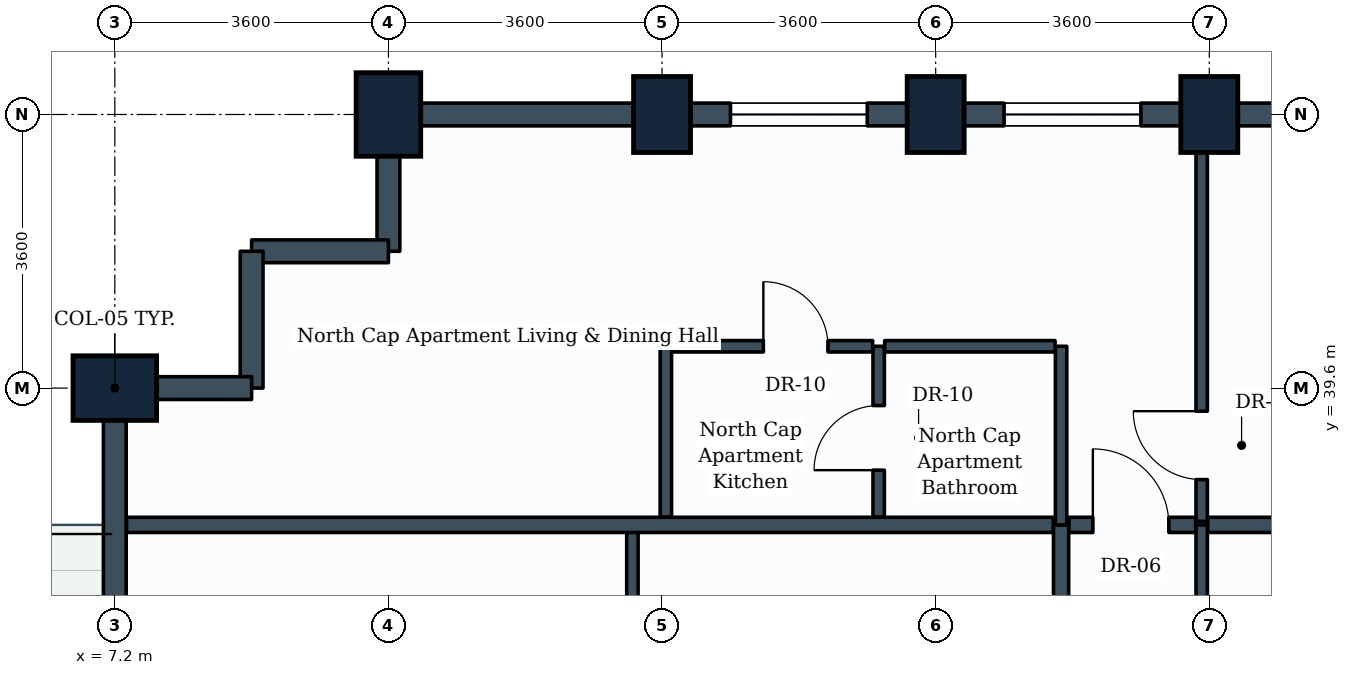
"""IFC4 building model, lengths in metres.
Left out: names, types, materials, properties, quantities, classifications, styles, units other than length and angle.
Written with IfcOpenShell. Run it as: python <this file> out.ifc"""

import sys

from ifc_helpers import new_model, si_unit, direction, frame, frame_2d, origin, origin_2d, place, context, subcontext, project, spatial, rectangle, extrude, element, fill, save


model = new_model("IFC4")
c1 = context("Model", 3, precision=1e-05, world=origin(), true_north=direction((0.0, 1.0)))
c2 = subcontext(c1, "Body", "Model", "MODEL_VIEW")
j1 = project(units=[si_unit("LENGTHUNIT", "METRE"), si_unit("PLANEANGLEUNIT", "RADIAN")], contexts=[c1])
p1 = place(None, origin())
s1 = spatial("IfcSite", under=j1, at=p1, CompositionType="ELEMENT")
p2 = place(p1, origin())
s2 = spatial("IfcBuilding", under=s1, at=p2, CompositionType="ELEMENT")
p3 = place(p2, frame((0.0, 0.0, 150.4)))
s3 = spatial("IfcBuildingStorey", under=s2, at=p3, CompositionType="ELEMENT", Elevation=150.4)
for number, where, z_axis, x_axis in (
    (1, (7.2, 39.6, 0.0), (0.0, 0.0, 1.0), (0.0, 1.0, 0.0)),
    (2, (10.8, 43.2, 0.0), (0.0, 0.0, 1.0), (1.0, 0.0, 0.0)),
):
    element("IfcColumn", number, at=place(p3, frame(where, z_axis=z_axis, x_axis=x_axis)), inside=s3, PredefinedType="COLUMN", context=c2, shape_type="SweptSolid", body=[
        extrude(rectangle(XDim=0.85, YDim=1.1, at=origin_2d()), origin(), (0.0, 0.0, 1.0), 3.8),
    ])
for number, where, z_axis, x_axis in (
    (3, (14.4, 43.2, 0.0), (0.0, 0.0, 1.0), (1.0, 0.0, 0.0)),
    (4, (18.0, 43.2, 0.0), (0.0, 0.0, 1.0), (1.0, 0.0, 0.0)),
    (5, (21.6, 43.2, 0.0), (0.0, 0.0, 1.0), (1.0, 0.0, 0.0)),
):
    element("IfcColumn", number, at=place(p3, frame(where, z_axis=z_axis, x_axis=x_axis)), inside=s3, PredefinedType="COLUMN", context=c2, shape_type="SweptSolid", body=[
        extrude(rectangle(XDim=0.75, YDim=1.0, at=origin_2d()), origin(), (0.0, 0.0, 1.0), 3.8),
    ])
p4 = place(p3, frame((21.6, 43.2, 0.0), z_axis=(0.0, 0.0, 1.0), x_axis=(1.0, 0.0, 0.0)))
e6 = element("IfcWall", 6, at=p4, inside=s3, PredefinedType="STANDARD", context=c2, shape_type="SweptSolid", body=[
    extrude(rectangle(XDim=3.6, YDim=0.3, at=frame_2d((1.8, 0.0))), origin(), (0.0, 0.0, 1.0), 2.93),
])
p5 = place(p4, frame((0.875, 0.0, 0.85)))
e7 = element("IfcOpeningElement", 7, at=p5, cuts=e6, PredefinedType="OPENING", context=c2, shape_type="SweptSolid", body=[
    extrude(rectangle(XDim=1.8, YDim=1.35, at=frame_2d((0.9, 0.675))), frame((0.0, 0.16, 0.0), z_axis=(0.0, -1.0, 0.0), x_axis=(1.0, 0.0, 0.0)), (0.0, 0.0, 1.0), 0.32),
])
p6 = place(p3, frame((18.0, 43.2, 0.0), z_axis=(0.0, 0.0, 1.0), x_axis=(1.0, 0.0, 0.0)))
e8 = element("IfcWall", 8, at=p6, inside=s3, PredefinedType="STANDARD", context=c2, shape_type="SweptSolid", body=[
    extrude(rectangle(XDim=3.6, YDim=0.3, at=frame_2d((1.8, 0.0))), origin(), (0.0, 0.0, 1.0), 2.93),
])
p7 = place(p6, frame((0.9, 0.0, 0.85)))
e9 = element("IfcOpeningElement", 9, at=p7, cuts=e8, PredefinedType="OPENING", context=c2, shape_type="SweptSolid", body=[
    extrude(rectangle(XDim=1.8, YDim=1.35, at=frame_2d((0.9, 0.675))), frame((0.0, 0.16, 0.0), z_axis=(0.0, -1.0, 0.0), x_axis=(1.0, 0.0, 0.0)), (0.0, 0.0, 1.0), 0.32),
])
p8 = place(p3, frame((14.4, 43.2, 0.0), z_axis=(0.0, 0.0, 1.0), x_axis=(1.0, 0.0, 0.0)))
e10 = element("IfcWall", 10, at=p8, inside=s3, PredefinedType="STANDARD", context=c2, shape_type="SweptSolid", body=[
    extrude(rectangle(XDim=3.6, YDim=0.3, at=frame_2d((1.8, 0.0))), origin(), (0.0, 0.0, 1.0), 2.93),
])
p9 = place(p8, frame((0.9, 0.0, 0.85)))
e11 = element("IfcOpeningElement", 11, at=p9, cuts=e10, PredefinedType="OPENING", context=c2, shape_type="SweptSolid", body=[
    extrude(rectangle(XDim=1.8, YDim=1.35, at=frame_2d((0.9, 0.675))), frame((0.0, 0.16, 0.0), z_axis=(0.0, -1.0, 0.0), x_axis=(1.0, 0.0, 0.0)), (0.0, 0.0, 1.0), 0.32),
])
p10 = place(p3, frame((10.8, 43.2, 0.0), z_axis=(0.0, 0.0, 1.0), x_axis=(1.0, 0.0, 0.0)))
e12 = element("IfcWall", 12, at=p10, inside=s3, PredefinedType="STANDARD", context=c2, shape_type="SweptSolid", body=[
    extrude(rectangle(XDim=3.6, YDim=0.3, at=frame_2d((1.8, 0.0))), origin(), (0.0, 0.0, 1.0), 2.93),
])
p11 = place(p3, frame((10.8, 41.4, 0.0), z_axis=(0.0, 0.0, 1.0), x_axis=(0.0, 1.0, 0.0)))
e13 = element("IfcWall", 13, at=p11, inside=s3, PredefinedType="STANDARD", context=c2, shape_type="SweptSolid", body=[
    extrude(rectangle(XDim=1.8, YDim=0.3, at=frame_2d((0.9, 0.0))), origin(), (0.0, 0.0, 1.0), 2.93),
])
p12 = place(p3, frame((9.0, 41.4, 0.0), z_axis=(0.0, 0.0, 1.0), x_axis=(1.0, 0.0, 0.0)))
e14 = element("IfcWall", 14, at=p12, inside=s3, PredefinedType="STANDARD", context=c2, shape_type="SweptSolid", body=[
    extrude(rectangle(XDim=1.8, YDim=0.3, at=frame_2d((0.9, 0.0))), origin(), (0.0, 0.0, 1.0), 3.535),
])
p13 = place(p3, frame((9.0, 39.6, 0.0), z_axis=(0.0, 0.0, 1.0), x_axis=(0.0, 1.0, 0.0)))
e15 = element("IfcWall", 15, at=p13, inside=s3, PredefinedType="STANDARD", context=c2, shape_type="SweptSolid", body=[
    extrude(rectangle(XDim=1.8, YDim=0.3, at=frame_2d((0.9, 0.0))), origin(), (0.0, 0.0, 1.0), 3.535),
])
p14 = place(p3, frame((7.2, 39.6, 0.0), z_axis=(0.0, 0.0, 1.0), x_axis=(1.0, 0.0, 0.0)))
e16 = element("IfcWall", 16, at=p14, inside=s3, PredefinedType="STANDARD", context=c2, shape_type="SweptSolid", body=[
    extrude(rectangle(XDim=1.8, YDim=0.3, at=frame_2d((0.9, 0.0))), origin(), (0.0, 0.0, 1.0), 2.93),
])
p15 = place(p3, frame((7.2, 36.0, 0.0), z_axis=(0.0, 0.0, 1.0), x_axis=(0.0, 1.0, 0.0)))
e17 = element("IfcWall", 17, at=p15, inside=s3, PredefinedType="STANDARD", context=c2, shape_type="SweptSolid", body=[
    extrude(rectangle(XDim=3.6, YDim=0.3, at=frame_2d((1.8, 0.0))), origin(), (0.0, 0.0, 1.0), 2.93),
])
p16 = place(p3, frame((19.65, 33.7, 0.0), z_axis=(0.0, 0.0, 1.0), x_axis=(0.0, 1.0, 0.0)))
e18 = element("IfcWall", 18, at=p16, inside=s3, PredefinedType="PARTITIONING", context=c2, shape_type="SweptSolid", body=[
    extrude(rectangle(XDim=4.1, YDim=0.2, at=frame_2d((2.05, 0.0))), origin(), (0.0, 0.0, 1.0), 3.17),
])
p17 = place(p16, frame((1.55, 0.0, 0.0)))
e19 = element("IfcOpeningElement", 19, at=p17, cuts=e18, PredefinedType="OPENING", context=c2, shape_type="SweptSolid", body=[
    extrude(rectangle(XDim=1.0, YDim=2.1, at=frame_2d((0.5, 1.05))), frame((0.0, 0.11, 0.0), z_axis=(0.0, -1.0, 0.0), x_axis=(1.0, 0.0, 0.0)), (0.0, 0.0, 1.0), 0.22),
])
p18 = place(p3, frame((14.01, 33.9, 0.0), z_axis=(0.0, 0.0, 1.0), x_axis=(0.0, 1.0, 0.0)))
e20 = element("IfcWall", 20, at=p18, inside=s3, PredefinedType="PARTITIONING", context=c2, shape_type="SweptSolid", body=[
    extrude(rectangle(XDim=3.9, YDim=0.15, at=frame_2d((1.95, 0.0))), origin(), (0.0, 0.0, 1.0), 3.17),
])
p19 = place(p18, frame((1.461, 0.0, 0.0)))
e21 = element("IfcOpeningElement", 21, at=p19, cuts=e20, PredefinedType="OPENING", context=c2, shape_type="SweptSolid", body=[
    extrude(rectangle(XDim=0.9, YDim=2.1, at=frame_2d((0.45, 1.05))), frame((0.0, 0.085, 0.0), z_axis=(0.0, -1.0, 0.0), x_axis=(1.0, 0.0, 0.0)), (0.0, 0.0, 1.0), 0.17),
])
p20 = place(p3, frame((21.5, 32.379, 0.0), z_axis=(0.0, 0.0, 1.0), x_axis=(0.0, 1.0, 0.0)))
e22 = element("IfcWall", 22, at=p20, inside=s3, PredefinedType="PARTITIONING", context=c2, shape_type="SweptSolid", body=[
    extrude(rectangle(XDim=5.421, YDim=0.15, at=frame_2d((2.71, 0.0))), origin(), (0.0, 0.0, 1.0), 3.17),
])
p21 = place(p20, frame((2.171, 0.0, 0.0)))
e23 = element("IfcOpeningElement", 23, at=p21, cuts=e22, PredefinedType="OPENING", context=c2, shape_type="SweptSolid", body=[
    extrude(rectangle(XDim=1.0, YDim=2.1, at=frame_2d((0.5, 1.05))), frame((0.0, 0.085, 0.0), z_axis=(0.0, -1.0, 0.0), x_axis=(1.0, 0.0, 0.0)), (0.0, 0.0, 1.0), 0.17),
])
p22 = place(p3, frame((7.354, 37.8, 0.0), z_axis=(0.0, 0.0, 1.0), x_axis=(1.0, 0.0, 0.0)))
e24 = element("IfcWall", 24, at=p22, inside=s3, PredefinedType="PARTITIONING", context=c2, shape_type="SweptSolid", body=[
    extrude(rectangle(XDim=12.192, YDim=0.2, at=frame_2d((6.096, 0.0))), origin(), (0.0, 0.0, 1.0), 2.93),
])
p23 = place(p3, frame((21.579, 37.8, 0.0), z_axis=(0.0, 0.0, 1.0), x_axis=(1.0, 0.0, 0.0)))
e25 = element("IfcWall", 25, at=p23, inside=s3, PredefinedType="PARTITIONING", context=c2, shape_type="SweptSolid", body=[
    extrude(rectangle(XDim=5.121, YDim=0.2, at=frame_2d((2.561, 0.0))), origin(), (0.0, 0.0, 1.0), 3.535),
])
p24 = place(p3, frame((19.754, 37.8, 0.0), z_axis=(0.0, 0.0, 1.0), x_axis=(1.0, 0.0, 0.0)))
e26 = element("IfcWall", 26, at=p24, inside=s3, PredefinedType="PARTITIONING", context=c2, shape_type="SweptSolid", body=[
    extrude(rectangle(XDim=1.667, YDim=0.2, at=frame_2d((0.833, 0.0))), origin(), (0.0, 0.0, 1.0), 3.535),
])
p25 = place(p24, frame((0.314, 0.0, 0.0)))
e27 = element("IfcOpeningElement", 27, at=p25, cuts=e26, PredefinedType="OPENING", context=c2, shape_type="SweptSolid", body=[
    extrude(rectangle(XDim=1.0, YDim=2.1, at=frame_2d((0.5, 1.05))), frame((0.0, 0.11, 0.0), z_axis=(0.0, -1.0, 0.0), x_axis=(1.0, 0.0, 0.0)), (0.0, 0.0, 1.0), 0.22),
])
p26 = place(p3, frame((19.65, 37.8, 0.0), z_axis=(0.0, 0.0, 1.0), x_axis=(0.0, 1.0, 0.0)))
e28 = element("IfcWall", 28, at=p26, inside=s3, PredefinedType="PARTITIONING", context=c2, shape_type="SweptSolid", body=[
    extrude(rectangle(XDim=2.35, YDim=0.15, at=frame_2d((1.175, 0.0))), origin(), (0.0, 0.0, 1.0), 3.535),
])
p27 = place(p3, frame((17.25, 37.904, 0.0), z_axis=(0.0, 0.0, 1.0), x_axis=(0.0, 1.0, 0.0)))
e29 = element("IfcWall", 29, at=p27, inside=s3, PredefinedType="PARTITIONING", context=c2, shape_type="SweptSolid", body=[
    extrude(rectangle(XDim=2.246, YDim=0.15, at=frame_2d((1.123, 0.0))), origin(), (0.0, 0.0, 1.0), 3.535),
])
p28 = place(p27, frame((0.616, 0.0, 0.0)))
e30 = element("IfcOpeningElement", 30, at=p28, cuts=e29, PredefinedType="OPENING", context=c2, shape_type="SweptSolid", body=[
    extrude(rectangle(XDim=0.85, YDim=2.1, at=frame_2d((0.425, 1.05))), frame((0.0, 0.085, 0.0), z_axis=(0.0, -1.0, 0.0), x_axis=(1.0, 0.0, 0.0)), (0.0, 0.0, 1.0), 0.17),
])
p29 = place(p3, frame((17.329, 40.15, 0.0), z_axis=(0.0, 0.0, 1.0), x_axis=(1.0, 0.0, 0.0)))
e31 = element("IfcWall", 31, at=p29, inside=s3, PredefinedType="PARTITIONING", context=c2, shape_type="SweptSolid", body=[
    extrude(rectangle(XDim=2.242, YDim=0.15, at=frame_2d((1.121, 0.0))), origin(), (0.0, 0.0, 1.0), 3.17),
])
p30 = place(p3, frame((21.5, 37.846, 0.0), z_axis=(0.0, 0.0, 1.0), x_axis=(0.0, 1.0, 0.0)))
e32 = element("IfcWall", 32, at=p30, inside=s3, PredefinedType="PARTITIONING", context=c2, shape_type="SweptSolid", body=[
    extrude(rectangle(XDim=5.2, YDim=0.15, at=frame_2d((2.6, 0.0))), origin(), (0.0, 0.0, 1.0), 2.93),
])
p31 = place(p30, frame((0.55, 0.0, 0.0)))
e33 = element("IfcOpeningElement", 33, at=p31, cuts=e32, PredefinedType="OPENING", context=c2, shape_type="SweptSolid", body=[
    extrude(rectangle(XDim=0.9, YDim=2.1, at=frame_2d((0.45, 1.05))), frame((0.0, 0.085, 0.0), z_axis=(0.0, -1.0, 0.0), x_axis=(1.0, 0.0, 0.0)), (0.0, 0.0, 1.0), 0.17),
])
p32 = place(p3, frame((14.45, 37.904, 0.0), z_axis=(0.0, 0.0, 1.0), x_axis=(0.0, 1.0, 0.0)))
e34 = element("IfcWall", 34, at=p32, inside=s3, PredefinedType="PARTITIONING", context=c2, shape_type="SweptSolid", body=[
    extrude(rectangle(XDim=2.246, YDim=0.15, at=frame_2d((1.123, 0.0))), origin(), (0.0, 0.0, 1.0), 3.535),
])
p33 = place(p3, frame((14.529, 40.15, 0.0), z_axis=(0.0, 0.0, 1.0), x_axis=(1.0, 0.0, 0.0)))
e35 = element("IfcWall", 35, at=p33, inside=s3, PredefinedType="PARTITIONING", context=c2, shape_type="SweptSolid", body=[
    extrude(rectangle(XDim=2.642, YDim=0.15, at=frame_2d((1.321, 0.0))), origin(), (0.0, 0.0, 1.0), 3.535),
])
p34 = place(p33, frame((1.204, 0.0, 0.0)))
e36 = element("IfcOpeningElement", 36, at=p34, cuts=e35, PredefinedType="OPENING", context=c2, shape_type="SweptSolid", body=[
    extrude(rectangle(XDim=0.85, YDim=2.1, at=frame_2d((0.425, 1.05))), frame((0.0, 0.085, 0.0), z_axis=(0.0, -1.0, 0.0), x_axis=(1.0, 0.0, 0.0)), (0.0, 0.0, 1.0), 0.17),
])
p35 = place(p7, origin())
e37 = element("IfcWindow", 37, at=p35, inside=s3, PartitioningType="SINGLE_PANEL", PredefinedType="WINDOW", context=c2, shape_type="SweptSolid", body=[
    extrude(rectangle(XDim=1.8, YDim=1.35, at=frame_2d((0.9, 0.675))), frame((0.0, 0.03, 0.0), z_axis=(0.0, -1.0, 0.0), x_axis=(1.0, 0.0, 0.0)), (0.0, 0.0, 1.0), 0.06),
])
fill(e9, e37)
p36 = place(p9, origin())
e38 = element("IfcWindow", 38, at=p36, inside=s3, PartitioningType="SINGLE_PANEL", PredefinedType="WINDOW", context=c2, shape_type="SweptSolid", body=[
    extrude(rectangle(XDim=1.8, YDim=1.35, at=frame_2d((0.9, 0.675))), frame((0.0, 0.03, 0.0), z_axis=(0.0, -1.0, 0.0), x_axis=(1.0, 0.0, 0.0)), (0.0, 0.0, 1.0), 0.06),
])
fill(e11, e38)
p37 = place(p25, origin())
e39 = element("IfcDoor", 39, at=p37, inside=s3, OperationType="SINGLE_SWING_LEFT", PredefinedType="DOOR", context=c2, shape_type="SweptSolid", body=[
    extrude(rectangle(XDim=1.0, YDim=2.1, at=frame_2d((0.5, 1.05))), frame((0.0, 0.025, 0.0), z_axis=(0.0, -1.0, 0.0), x_axis=(1.0, 0.0, 0.0)), (0.0, 0.0, 1.0), 0.05),
])
fill(e27, e39)
p38 = place(p28, origin())
e40 = element("IfcDoor", 40, at=p38, inside=s3, OperationType="SINGLE_SWING_LEFT", PredefinedType="DOOR", context=c2, shape_type="SweptSolid", body=[
    extrude(rectangle(XDim=0.85, YDim=2.1, at=frame_2d((0.425, 1.05))), frame((0.0, 0.025, 0.0), z_axis=(0.0, -1.0, 0.0), x_axis=(1.0, 0.0, 0.0)), (0.0, 0.0, 1.0), 0.05),
])
fill(e30, e40)
p39 = place(p31, origin())
e41 = element("IfcDoor", 41, at=p39, inside=s3, OperationType="SINGLE_SWING_RIGHT", PredefinedType="DOOR", context=c2, shape_type="SweptSolid", body=[
    extrude(rectangle(XDim=0.9, YDim=2.1, at=frame_2d((0.45, 1.05))), frame((0.0, 0.025, 0.0), z_axis=(0.0, -1.0, 0.0), x_axis=(1.0, 0.0, 0.0)), (0.0, 0.0, 1.0), 0.05),
])
fill(e33, e41)
p40 = place(p34, origin())
e42 = element("IfcDoor", 42, at=p40, inside=s3, OperationType="SINGLE_SWING_LEFT", PredefinedType="DOOR", context=c2, shape_type="SweptSolid", body=[
    extrude(rectangle(XDim=0.85, YDim=2.1, at=frame_2d((0.425, 1.05))), frame((0.0, 0.025, 0.0), z_axis=(0.0, -1.0, 0.0), x_axis=(1.0, 0.0, 0.0)), (0.0, 0.0, 1.0), 0.05),
])
fill(e36, e42)
save(model, sys.argv[1])
